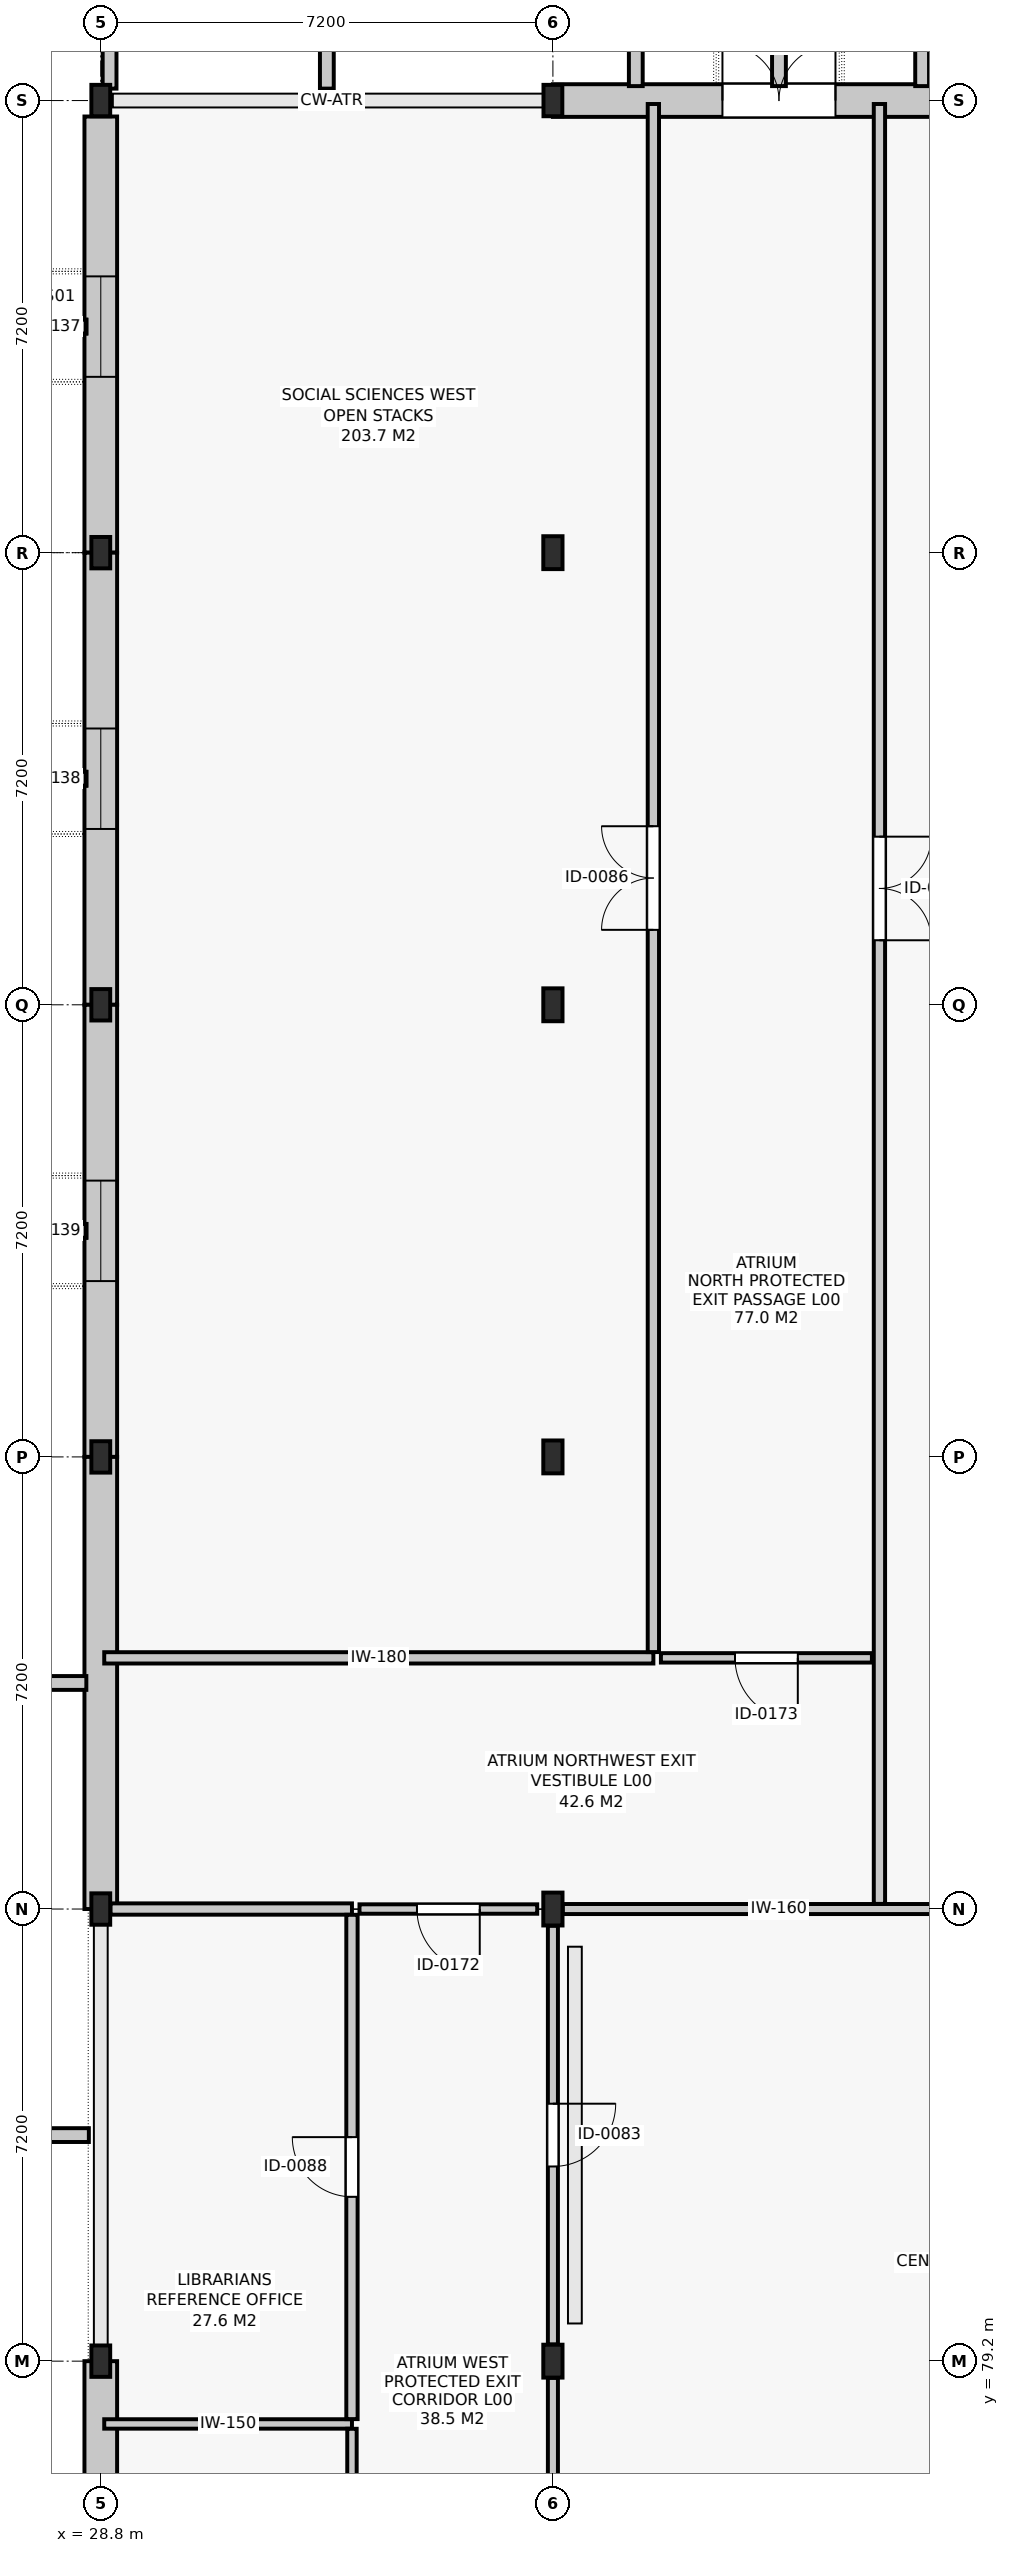
"""IFC4 building model, lengths in metres.
Left out: names, types, materials, properties, quantities, classifications, styles, units other than length and angle.
Written with IfcOpenShell. Run it as: python <this file> out.ifc"""

import sys

from ifc_helpers import new_model, si_unit, direction, frame, frame_2d, origin, origin_2d, place, context, subcontext, project, spatial, rectangle, i_section, extrude, element, fill, save


model = new_model("IFC4")
c1 = context("Model", 3, precision=1e-05, world=origin(), true_north=direction((0.0, 1.0)))
c2 = subcontext(c1, "Body", "Model", "MODEL_VIEW")
j1 = project(units=[si_unit("LENGTHUNIT", "METRE"), si_unit("PLANEANGLEUNIT", "RADIAN")], contexts=[c1])
p1 = place(None, origin())
s1 = spatial("IfcSite", under=j1, at=p1, CompositionType="ELEMENT")
p2 = place(p1, origin())
s2 = spatial("IfcBuilding", under=s1, at=p2, CompositionType="ELEMENT")
p3 = place(p2, origin())
s3 = spatial("IfcBuildingStorey", under=s2, at=p3, CompositionType="ELEMENT", Elevation=0.0)
for number, where, z_axis, x_axis in (
    (1, (28.8, 79.2, 0.0), (0.0, 0.0, 1.0), (1.0, 0.0, 0.0)),
    (2, (28.8, 86.4, 0.0), (0.0, 0.0, 1.0), (1.0, 0.0, 0.0)),
    (3, (28.8, 93.6, 0.0), (0.0, 0.0, 1.0), (1.0, 0.0, 0.0)),
    (4, (28.8, 100.8, 0.0), (0.0, 0.0, 1.0), (1.0, 0.0, 0.0)),
    (5, (28.8, 108.0, 0.0), (0.0, 0.0, 1.0), (1.0, 0.0, 0.0)),
    (6, (28.8, 115.2, 0.0), (0.0, 0.0, 1.0), (1.0, 0.0, 0.0)),
):
    element("IfcColumn", number, at=place(p3, frame(where, z_axis=z_axis, x_axis=x_axis)), inside=s3, PredefinedType="COLUMN", context=c2, shape_type="SweptSolid", body=[
        extrude(i_section(OverallWidth=0.3, OverallDepth=0.5, WebThickness=0.014, FlangeThickness=0.028, FilletRadius=0.027, at=origin_2d()), origin(), (0.0, 0.0, 1.0), 5.4),
    ])
for number, where, z_axis, x_axis in (
    (7, (36.0, 79.2, 0.0), (0.0, 0.0, 1.0), (1.0, 0.0, 0.0)),
    (8, (36.0, 86.4, 0.0), (0.0, 0.0, 1.0), (1.0, 0.0, 0.0)),
    (9, (36.0, 93.6, 0.0), (0.0, 0.0, 1.0), (1.0, 0.0, 0.0)),
    (10, (36.0, 100.8, 0.0), (0.0, 0.0, 1.0), (1.0, 0.0, 0.0)),
    (11, (36.0, 108.0, 0.0), (0.0, 0.0, 1.0), (1.0, 0.0, 0.0)),
):
    element("IfcColumn", number, at=place(p3, frame(where, z_axis=z_axis, x_axis=x_axis)), inside=s3, PredefinedType="COLUMN", context=c2, shape_type="SweptSolid", body=[
        extrude(i_section(OverallWidth=0.306, OverallDepth=0.524, WebThickness=0.021, FlangeThickness=0.04, FilletRadius=0.027, at=origin_2d()), origin(), (0.0, 0.0, 1.0), 5.4),
    ])
p4 = place(p3, frame((36.0, 115.2, 0.0), z_axis=(0.0, 0.0, 1.0), x_axis=(1.0, 0.0, 0.0)))
e12 = element("IfcColumn", 12, at=p4, inside=s3, PredefinedType="COLUMN", context=c2, shape_type="SweptSolid", body=[
    extrude(i_section(OverallWidth=0.3, OverallDepth=0.5, WebThickness=0.014, FlangeThickness=0.028, FilletRadius=0.027, at=origin_2d()), origin(), (0.0, 0.0, 1.0), 5.4),
])
p5 = place(p3, frame((43.2, 115.2, 0.0), z_axis=(0.0, 0.0, 1.0), x_axis=(-1.0, 0.0, 0.0)))
e13 = element("IfcWall", 13, at=p5, inside=s3, PredefinedType="SOLIDWALL", context=c2, shape_type="SweptSolid", body=[
    extrude(rectangle(XDim=7.2, YDim=0.52, at=frame_2d((3.6, 0.0))), origin(), (0.0, 0.0, 1.0), 4.4),
])
p6 = place(p5, frame((2.7, 0.0, 0.0)))
e14 = element("IfcOpeningElement", 14, at=p6, cuts=e13, PredefinedType="OPENING", context=c2, shape_type="SweptSolid", body=[
    extrude(rectangle(XDim=1.8, YDim=2.2, at=frame_2d((0.9, 1.1))), frame((0.0, 0.272, 0.0), z_axis=(0.0, -1.0, 0.0), x_axis=(1.0, 0.0, 0.0)), (0.0, 0.0, 1.0), 0.544),
])
p7 = place(p3, frame((28.8, 114.946, 0.0), z_axis=(0.0, 0.0, 1.0), x_axis=(0.0, -1.0, 0.0)))
e15 = element("IfcWall", 15, at=p7, inside=s3, PredefinedType="SOLIDWALL", context=c2, shape_type="SweptSolid", body=[
    extrude(rectangle(XDim=6.946, YDim=0.52, at=frame_2d((3.473, 0.0))), origin(), (0.0, 0.0, 1.0), 4.4),
])
p8 = place(p7, frame((2.546, 0.0, 0.95)))
e16 = element("IfcOpeningElement", 16, at=p8, cuts=e15, PredefinedType="OPENING", context=c2, shape_type="SweptSolid", body=[
    extrude(rectangle(XDim=1.6, YDim=2.2, at=frame_2d((0.8, 1.1))), frame((0.0, 0.272, 0.0), z_axis=(0.0, -1.0, 0.0), x_axis=(1.0, 0.0, 0.0)), (0.0, 0.0, 1.0), 0.544),
])
p9 = place(p3, frame((28.8, 108.0, 0.0), z_axis=(0.0, 0.0, 1.0), x_axis=(0.0, -1.0, 0.0)))
e17 = element("IfcWall", 17, at=p9, inside=s3, PredefinedType="SOLIDWALL", context=c2, shape_type="SweptSolid", body=[
    extrude(rectangle(XDim=7.2, YDim=0.52, at=frame_2d((3.6, 0.0))), origin(), (0.0, 0.0, 1.0), 4.4),
])
p10 = place(p9, frame((2.8, 0.0, 0.95)))
e18 = element("IfcOpeningElement", 18, at=p10, cuts=e17, PredefinedType="OPENING", context=c2, shape_type="SweptSolid", body=[
    extrude(rectangle(XDim=1.6, YDim=2.2, at=frame_2d((0.8, 1.1))), frame((0.0, 0.272, 0.0), z_axis=(0.0, -1.0, 0.0), x_axis=(1.0, 0.0, 0.0)), (0.0, 0.0, 1.0), 0.544),
])
p11 = place(p3, frame((28.8, 100.8, 0.0), z_axis=(0.0, 0.0, 1.0), x_axis=(0.0, -1.0, 0.0)))
e19 = element("IfcWall", 19, at=p11, inside=s3, PredefinedType="SOLIDWALL", context=c2, shape_type="SweptSolid", body=[
    extrude(rectangle(XDim=7.2, YDim=0.52, at=frame_2d((3.6, 0.0))), origin(), (0.0, 0.0, 1.0), 4.4),
])
p12 = place(p11, frame((2.8, 0.0, 0.95)))
e20 = element("IfcOpeningElement", 20, at=p12, cuts=e19, PredefinedType="OPENING", context=c2, shape_type="SweptSolid", body=[
    extrude(rectangle(XDim=1.6, YDim=2.2, at=frame_2d((0.8, 1.1))), frame((0.0, 0.272, 0.0), z_axis=(0.0, -1.0, 0.0), x_axis=(1.0, 0.0, 0.0)), (0.0, 0.0, 1.0), 0.544),
])
p13 = place(p3, frame((28.8, 93.6, 0.0), z_axis=(0.0, 0.0, 1.0), x_axis=(0.0, -1.0, 0.0)))
e21 = element("IfcWall", 21, at=p13, inside=s3, PredefinedType="SOLIDWALL", context=c2, shape_type="SweptSolid", body=[
    extrude(rectangle(XDim=7.2, YDim=0.52, at=frame_2d((3.6, 0.0))), origin(), (0.0, 0.0, 1.0), 4.4),
])
p14 = place(p3, frame((28.8, 79.2, 0.0), z_axis=(0.0, 0.0, 1.0), x_axis=(0.0, -1.0, 0.0)))
e22 = element("IfcWall", 22, at=p14, inside=s3, PredefinedType="SOLIDWALL", context=c2, shape_type="SweptSolid", body=[
    extrude(rectangle(XDim=7.2, YDim=0.52, at=frame_2d((3.6, 0.0))), origin(), (0.0, 0.0, 1.0), 4.4),
])
p15 = place(p14, frame((2.8, 0.0, 0.95)))
e23 = element("IfcOpeningElement", 23, at=p15, cuts=e22, PredefinedType="OPENING", context=c2, shape_type="SweptSolid", body=[
    extrude(rectangle(XDim=1.6, YDim=2.2, at=frame_2d((0.8, 1.1))), frame((0.0, 0.272, 0.0), z_axis=(0.0, -1.0, 0.0), x_axis=(1.0, 0.0, 0.0)), (0.0, 0.0, 1.0), 0.544),
])
p16 = place(p3, frame((28.855, 78.2, 0.0), z_axis=(0.0, 0.0, 1.0), x_axis=(1.0, 0.0, 0.0)))
e24 = element("IfcWall", 24, at=p16, inside=s3, PredefinedType="PARTITIONING", context=c2, shape_type="SweptSolid", body=[
    extrude(rectangle(XDim=3.945, YDim=0.15, at=frame_2d((1.973, 0.0))), origin(), (0.0, 0.0, 1.0), 4.555),
])
p17 = place(p3, frame((36.157, 86.4, 0.0), z_axis=(0.0, 0.0, 1.0), x_axis=(1.0, 0.0, 0.0)))
e25 = element("IfcWall", 25, at=p17, inside=s3, PredefinedType="PARTITIONING", context=c2, shape_type="SweptSolid", body=[
    extrude(rectangle(XDim=6.886, YDim=0.16, at=frame_2d((3.443, 0.0))), origin(), (0.0, 0.0, 1.0), 5.105),
])
p18 = place(p3, frame((28.855, 90.4, 0.0), z_axis=(0.0, 0.0, 1.0), x_axis=(1.0, 0.0, 0.0)))
e26 = element("IfcWall", 26, at=p18, inside=s3, PredefinedType="PARTITIONING", context=c2, shape_type="SweptSolid", body=[
    extrude(rectangle(XDim=8.745, YDim=0.18, at=frame_2d((4.373, 0.0))), origin(), (0.0, 0.0, 1.0), 4.555),
])
p19 = place(p3, frame((28.954, 86.4, 0.0), z_axis=(0.0, 0.0, 1.0), x_axis=(1.0, 0.0, 0.0)))
e27 = element("IfcWall", 27, at=p19, inside=s3, PredefinedType="PARTITIONING", context=c2, shape_type="SweptSolid", body=[
    extrude(rectangle(XDim=3.846, YDim=0.18, at=frame_2d((1.923, 0.0))), origin(), (0.0, 0.0, 1.0), 4.615),
])
p20 = place(p3, frame((32.8, 72.077, 0.0), z_axis=(0.0, 0.0, 1.0), x_axis=(0.0, 1.0, 0.0)))
e28 = element("IfcWall", 28, at=p20, inside=s3, PredefinedType="PARTITIONING", context=c2, shape_type="SweptSolid", body=[
    extrude(rectangle(XDim=6.046, YDim=0.15, at=frame_2d((3.023, 0.0))), origin(), (0.0, 0.0, 1.0), 4.615),
])
p21 = place(p20, frame((2.533, 0.0, 0.0)))
e29 = element("IfcOpeningElement", 29, at=p21, cuts=e28, PredefinedType="OPENING", context=c2, shape_type="SweptSolid", body=[
    extrude(rectangle(XDim=0.98, YDim=2.1, at=frame_2d((0.49, 1.05))), frame((0.0, 0.087, 0.0), z_axis=(0.0, -1.0, 0.0), x_axis=(1.0, 0.0, 0.0)), (0.0, 0.0, 1.0), 0.174),
])
p22 = place(p3, frame((36.0, 72.266, 0.0), z_axis=(0.0, 0.0, 1.0), x_axis=(0.0, 1.0, 0.0)))
e30 = element("IfcWall", 30, at=p22, inside=s3, PredefinedType="PARTITIONING", context=c2, shape_type="SweptSolid", body=[
    extrude(rectangle(XDim=6.668, YDim=0.16, at=frame_2d((3.334, 0.0))), origin(), (0.0, 0.0, 1.0), 5.105),
])
p23 = place(p3, frame((36.0, 79.466, 0.0), z_axis=(0.0, 0.0, 1.0), x_axis=(0.0, 1.0, 0.0)))
e31 = element("IfcWall", 31, at=p23, inside=s3, PredefinedType="PARTITIONING", context=c2, shape_type="SweptSolid", body=[
    extrude(rectangle(XDim=6.668, YDim=0.16, at=frame_2d((3.334, 0.0))), origin(), (0.0, 0.0, 1.0), 5.105),
])
p24 = place(p23, frame((2.834, 0.0, 0.0)))
e32 = element("IfcOpeningElement", 32, at=p24, cuts=e31, PredefinedType="OPENING", context=c2, shape_type="SweptSolid", body=[
    extrude(rectangle(XDim=1.0, YDim=2.15, at=frame_2d((0.5, 1.075))), frame((0.0, 0.092, 0.0), z_axis=(0.0, -1.0, 0.0), x_axis=(1.0, 0.0, 0.0)), (0.0, 0.0, 1.0), 0.184),
])
p25 = place(p3, frame((41.2, 86.482, 0.0), z_axis=(0.0, 0.0, 1.0), x_axis=(0.0, 1.0, 0.0)))
e33 = element("IfcWall", 33, at=p25, inside=s3, PredefinedType="PARTITIONING", context=c2, shape_type="SweptSolid", body=[
    extrude(rectangle(XDim=28.663, YDim=0.18, at=frame_2d((14.332, 0.0))), origin(), (0.0, 0.0, 1.0), 4.555),
])
p26 = place(p25, frame((15.345, 0.0, 0.0)))
e34 = element("IfcOpeningElement", 34, at=p26, cuts=e33, PredefinedType="OPENING", context=c2, shape_type="SweptSolid", body=[
    extrude(rectangle(XDim=1.65, YDim=2.25, at=frame_2d((0.825, 1.125))), frame((0.0, 0.102, 0.0), z_axis=(0.0, -1.0, 0.0), x_axis=(1.0, 0.0, 0.0)), (0.0, 0.0, 1.0), 0.204),
])
p27 = place(p3, frame((37.6, 90.492, 0.0), z_axis=(0.0, 0.0, 1.0), x_axis=(0.0, 1.0, 0.0)))
e35 = element("IfcWall", 35, at=p27, inside=s3, PredefinedType="PARTITIONING", context=c2, shape_type="SweptSolid", body=[
    extrude(rectangle(XDim=24.653, YDim=0.18, at=frame_2d((12.327, 0.0))), origin(), (0.0, 0.0, 1.0), 4.555),
])
p28 = place(p27, frame((11.501, 0.0, 0.0)))
e36 = element("IfcOpeningElement", 36, at=p28, cuts=e35, PredefinedType="OPENING", context=c2, shape_type="SweptSolid", body=[
    extrude(rectangle(XDim=1.65, YDim=2.25, at=frame_2d((0.825, 1.125))), frame((0.0, 0.102, 0.0), z_axis=(0.0, -1.0, 0.0), x_axis=(1.0, 0.0, 0.0)), (0.0, 0.0, 1.0), 0.204),
])
p29 = place(p3, frame((32.8, 78.277, 0.0), z_axis=(0.0, 0.0, 1.0), x_axis=(0.0, 1.0, 0.0)))
e37 = element("IfcWall", 37, at=p29, inside=s3, PredefinedType="PARTITIONING", context=c2, shape_type="SweptSolid", body=[
    extrude(rectangle(XDim=8.031, YDim=0.18, at=frame_2d((4.016, 0.0))), origin(), (0.0, 0.0, 1.0), 4.615),
])
p30 = place(p29, frame((3.541, 0.0, 0.0)))
e38 = element("IfcOpeningElement", 38, at=p30, cuts=e37, PredefinedType="OPENING", context=c2, shape_type="SweptSolid", body=[
    extrude(rectangle(XDim=0.95, YDim=2.15, at=frame_2d((0.475, 1.075))), frame((0.0, 0.102, 0.0), z_axis=(0.0, -1.0, 0.0), x_axis=(1.0, 0.0, 0.0)), (0.0, 0.0, 1.0), 0.204),
])
p31 = place(p3, frame((32.92, 86.4, 0.0), z_axis=(0.0, 0.0, 1.0), x_axis=(1.0, 0.0, 0.0)))
e39 = element("IfcWall", 39, at=p31, inside=s3, PredefinedType="PARTITIONING", context=c2, shape_type="SweptSolid", body=[
    extrude(rectangle(XDim=2.83, YDim=0.15, at=frame_2d((1.415, 0.0))), origin(), (0.0, 0.0, 1.0), 4.615),
])
p32 = place(p31, frame((0.915, 0.0, 0.0)))
e40 = element("IfcOpeningElement", 40, at=p32, cuts=e39, PredefinedType="OPENING", context=c2, shape_type="SweptSolid", body=[
    extrude(rectangle(XDim=1.0, YDim=2.15, at=frame_2d((0.5, 1.075))), frame((0.0, 0.087, 0.0), z_axis=(0.0, -1.0, 0.0), x_axis=(1.0, 0.0, 0.0)), (0.0, 0.0, 1.0), 0.174),
])
p33 = place(p3, frame((37.72, 90.4, 0.0), z_axis=(0.0, 0.0, 1.0), x_axis=(1.0, 0.0, 0.0)))
e41 = element("IfcWall", 41, at=p33, inside=s3, PredefinedType="PARTITIONING", context=c2, shape_type="SweptSolid", body=[
    extrude(rectangle(XDim=3.36, YDim=0.15, at=frame_2d((1.68, 0.0))), origin(), (0.0, 0.0, 1.0), 5.105),
])
p34 = place(p33, frame((1.18, 0.0, 0.0)))
e42 = element("IfcOpeningElement", 42, at=p34, cuts=e41, PredefinedType="OPENING", context=c2, shape_type="SweptSolid", body=[
    extrude(rectangle(XDim=1.0, YDim=2.15, at=frame_2d((0.5, 1.075))), frame((0.0, 0.087, 0.0), z_axis=(0.0, -1.0, 0.0), x_axis=(1.0, 0.0, 0.0)), (0.0, 0.0, 1.0), 0.174),
])
p35 = place(p6, frame((1.8, 0.0, 0.0), z_axis=(0.0, 0.0, 1.0), x_axis=(-1.0, 0.0, 0.0)))
e43 = element("IfcDoor", 43, at=p35, inside=s3, OperationType="DOUBLE_DOOR_SINGLE_SWING", PredefinedType="DOOR", context=c2, shape_type="SweptSolid", body=[
    extrude(rectangle(XDim=1.8, YDim=2.2, at=frame_2d((0.9, 1.1))), frame((0.0, 0.025, 0.0), z_axis=(0.0, -1.0, 0.0), x_axis=(1.0, 0.0, 0.0)), (0.0, 0.0, 1.0), 0.05),
])
fill(e14, e43)
p36 = place(p8, origin())
e44 = element("IfcWindow", 44, at=p36, inside=s3, PartitioningType="SINGLE_PANEL", PredefinedType="WINDOW", context=c2, shape_type="SweptSolid", body=[
    extrude(rectangle(XDim=1.6, YDim=2.2, at=frame_2d((0.8, 1.1))), frame((0.0, 0.03, 0.0), z_axis=(0.0, -1.0, 0.0), x_axis=(1.0, 0.0, 0.0)), (0.0, 0.0, 1.0), 0.06),
])
fill(e16, e44)
p37 = place(p10, origin())
e45 = element("IfcWindow", 45, at=p37, inside=s3, PartitioningType="SINGLE_PANEL", PredefinedType="WINDOW", context=c2, shape_type="SweptSolid", body=[
    extrude(rectangle(XDim=1.6, YDim=2.2, at=frame_2d((0.8, 1.1))), frame((0.0, 0.03, 0.0), z_axis=(0.0, -1.0, 0.0), x_axis=(1.0, 0.0, 0.0)), (0.0, 0.0, 1.0), 0.06),
])
fill(e18, e45)
p38 = place(p12, origin())
e46 = element("IfcWindow", 46, at=p38, inside=s3, PartitioningType="SINGLE_PANEL", PredefinedType="WINDOW", context=c2, shape_type="SweptSolid", body=[
    extrude(rectangle(XDim=1.6, YDim=2.2, at=frame_2d((0.8, 1.1))), frame((0.0, 0.03, 0.0), z_axis=(0.0, -1.0, 0.0), x_axis=(1.0, 0.0, 0.0)), (0.0, 0.0, 1.0), 0.06),
])
fill(e20, e46)
p39 = place(p24, frame((1.0, 0.0, 0.0), z_axis=(0.0, 0.0, 1.0), x_axis=(-1.0, 0.0, 0.0)))
e47 = element("IfcDoor", 47, at=p39, inside=s3, OperationType="SINGLE_SWING_LEFT", PredefinedType="DOOR", context=c2, shape_type="SweptSolid", body=[
    extrude(rectangle(XDim=1.0, YDim=2.15, at=frame_2d((0.5, 1.075))), frame((0.0, 0.025, 0.0), z_axis=(0.0, -1.0, 0.0), x_axis=(1.0, 0.0, 0.0)), (0.0, 0.0, 1.0), 0.05),
])
fill(e32, e47)
p40 = place(p26, frame((1.65, 0.0, 0.0), z_axis=(0.0, 0.0, 1.0), x_axis=(-1.0, 0.0, 0.0)))
e48 = element("IfcDoor", 48, at=p40, inside=s3, OperationType="DOUBLE_DOOR_SINGLE_SWING", PredefinedType="DOOR", context=c2, shape_type="SweptSolid", body=[
    extrude(rectangle(XDim=1.65, YDim=2.25, at=frame_2d((0.825, 1.125))), frame((0.0, 0.025, 0.0), z_axis=(0.0, -1.0, 0.0), x_axis=(1.0, 0.0, 0.0)), (0.0, 0.0, 1.0), 0.05),
])
fill(e34, e48)
p41 = place(p28, origin())
e49 = element("IfcDoor", 49, at=p41, inside=s3, OperationType="DOUBLE_DOOR_SINGLE_SWING", PredefinedType="DOOR", context=c2, shape_type="SweptSolid", body=[
    extrude(rectangle(XDim=1.65, YDim=2.25, at=frame_2d((0.825, 1.125))), frame((0.0, 0.025, 0.0), z_axis=(0.0, -1.0, 0.0), x_axis=(1.0, 0.0, 0.0)), (0.0, 0.0, 1.0), 0.05),
])
fill(e36, e49)
p42 = place(p30, origin())
e50 = element("IfcDoor", 50, at=p42, inside=s3, OperationType="SINGLE_SWING_RIGHT", PredefinedType="DOOR", context=c2, shape_type="SweptSolid", body=[
    extrude(rectangle(XDim=0.95, YDim=2.15, at=frame_2d((0.475, 1.075))), frame((0.0, 0.025, 0.0), z_axis=(0.0, -1.0, 0.0), x_axis=(1.0, 0.0, 0.0)), (0.0, 0.0, 1.0), 0.05),
])
fill(e38, e50)
p43 = place(p32, frame((1.0, 0.0, 0.0), z_axis=(0.0, 0.0, 1.0), x_axis=(-1.0, 0.0, 0.0)))
e51 = element("IfcDoor", 51, at=p43, inside=s3, OperationType="SINGLE_SWING_LEFT", PredefinedType="DOOR", context=c2, shape_type="SweptSolid", body=[
    extrude(rectangle(XDim=1.0, YDim=2.15, at=frame_2d((0.5, 1.075))), frame((0.0, 0.025, 0.0), z_axis=(0.0, -1.0, 0.0), x_axis=(1.0, 0.0, 0.0)), (0.0, 0.0, 1.0), 0.05),
])
fill(e40, e51)
p44 = place(p34, frame((1.0, 0.0, 0.0), z_axis=(0.0, 0.0, 1.0), x_axis=(-1.0, 0.0, 0.0)))
e52 = element("IfcDoor", 52, at=p44, inside=s3, OperationType="SINGLE_SWING_LEFT", PredefinedType="DOOR", context=c2, shape_type="SweptSolid", body=[
    extrude(rectangle(XDim=1.0, YDim=2.15, at=frame_2d((0.5, 1.075))), frame((0.0, 0.025, 0.0), z_axis=(0.0, -1.0, 0.0), x_axis=(1.0, 0.0, 0.0)), (0.0, 0.0, 1.0), 0.05),
])
fill(e42, e52)
save(model, sys.argv[1])
